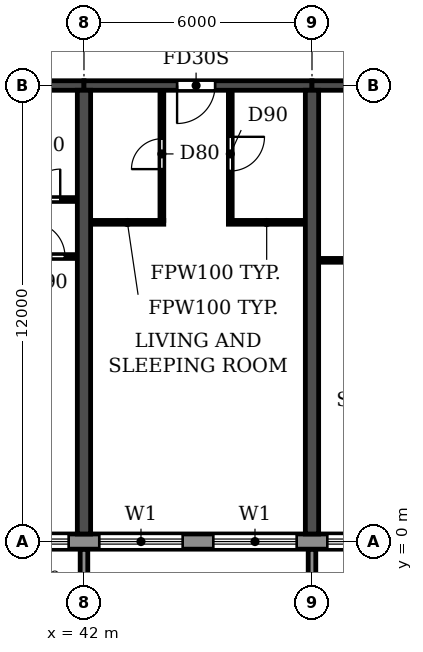
"""IFC4 building model, lengths in metres.
Left out: names, types, materials, properties, quantities, classifications, styles, units other than length and angle.
Written with IfcOpenShell. Run it as: python <this file> out.ifc"""

import sys

from ifc_helpers import new_model, si_unit, direction, frame, frame_2d, origin, place, context, subcontext, project, spatial, polyline, rectangle, outline, extrude, source, transform, mapped, element, fill, save


model = new_model("IFC4")
c1 = context("Model", 3, precision=1e-05, world=origin(), true_north=direction((0.0, 1.0)))
c2 = subcontext(c1, "Body", "Model", "MODEL_VIEW")
j1 = project(units=[si_unit("LENGTHUNIT", "METRE"), si_unit("PLANEANGLEUNIT", "RADIAN")], contexts=[c1])
p1 = place(None, origin())
s1 = spatial("IfcSite", under=j1, at=p1, CompositionType="ELEMENT")
p2 = place(p1, origin())
s2 = spatial("IfcBuilding", under=s1, at=p2, CompositionType="ELEMENT")
p3 = place(p2, frame((0.0, 0.0, 82.8)))
s3 = spatial("IfcBuildingStorey", under=s2, at=p3, CompositionType="ELEMENT", Elevation=82.8)
for number, where, z_axis, x_axis in (
    (1, (42.0, 0.2, 0.0), (0.0, 0.0, 1.0), (0.0, 1.0, 0.0)),
    (2, (48.0, 0.2, 0.0), (0.0, 0.0, 1.0), (0.0, 1.0, 0.0)),
):
    element("IfcWall", number, at=place(p3, frame(where, z_axis=z_axis, x_axis=x_axis)), inside=s3, PredefinedType="SHEAR", context=c2, shape_type="SweptSolid", body=[
        extrude(rectangle(XDim=11.675, YDim=0.35, at=frame_2d((5.837, 0.0))), origin(), (0.0, 0.0, 1.0), 3.06),
    ])
p4 = place(p3, frame((36.0, 12.0, 0.0), z_axis=(0.0, 0.0, 1.0), x_axis=(1.0, 0.0, 0.0)))
e3 = element("IfcWall", 3, at=p4, inside=s3, PredefinedType="SHEAR", context=c2, shape_type="SweptSolid", body=[
    extrude(rectangle(XDim=6.0, YDim=0.25, at=frame_2d((3.0, 0.0))), origin(), (0.0, 0.0, 1.0), 2.46),
])
p5 = place(p4, frame((2.55, 0.0, 0.0)))
e4 = element("IfcOpeningElement", 4, at=p5, cuts=e3, PredefinedType="OPENING", context=c2, shape_type="SweptSolid", body=[
    extrude(rectangle(XDim=1.0, YDim=2.1, at=frame_2d((0.5, 1.05))), frame((0.0, 0.135, 0.0), z_axis=(0.0, -1.0, 0.0), x_axis=(1.0, 0.0, 0.0)), (0.0, 0.0, 1.0), 0.27),
])
p6 = place(p3, frame((42.0, 12.0, 0.0), z_axis=(0.0, 0.0, 1.0), x_axis=(1.0, 0.0, 0.0)))
e5 = element("IfcWall", 5, at=p6, inside=s3, PredefinedType="SHEAR", context=c2, shape_type="SweptSolid", body=[
    extrude(rectangle(XDim=6.0, YDim=0.25, at=frame_2d((3.0, 0.0))), origin(), (0.0, 0.0, 1.0), 2.46),
])
p7 = place(p6, frame((2.45, 0.0, 0.0)))
e6 = element("IfcOpeningElement", 6, at=p7, cuts=e5, PredefinedType="OPENING", context=c2, shape_type="SweptSolid", body=[
    extrude(rectangle(XDim=1.0, YDim=2.1, at=frame_2d((0.5, 1.05))), frame((0.0, 0.135, 0.0), z_axis=(0.0, -1.0, 0.0), x_axis=(1.0, 0.0, 0.0)), (0.0, 0.0, 1.0), 0.27),
])
p8 = place(p3, frame((48.0, 12.0, 0.0), z_axis=(0.0, 0.0, 1.0), x_axis=(1.0, 0.0, 0.0)))
e7 = element("IfcWall", 7, at=p8, inside=s3, PredefinedType="SHEAR", context=c2, shape_type="SweptSolid", body=[
    extrude(rectangle(XDim=6.0, YDim=0.25, at=frame_2d((3.0, 0.0))), origin(), (0.0, 0.0, 1.0), 2.46),
])
p9 = place(p8, frame((2.45, 0.0, 0.0)))
e8 = element("IfcOpeningElement", 8, at=p9, cuts=e7, PredefinedType="OPENING", context=c2, shape_type="SweptSolid", body=[
    extrude(rectangle(XDim=1.0, YDim=2.1, at=frame_2d((0.5, 1.05))), frame((0.0, 0.135, 0.0), z_axis=(0.0, -1.0, 0.0), x_axis=(1.0, 0.0, 0.0)), (0.0, 0.0, 1.0), 0.27),
])
p10 = place(p3, frame((10.683, 0.0, 0.0), z_axis=(0.0, 0.0, 1.0), x_axis=(1.0, 0.0, 0.0)))
e9 = element("IfcWall", 9, at=p10, inside=s3, PredefinedType="STANDARD", context=c2, shape_type="SweptSolid", body=[
    extrude(rectangle(XDim=80.634, YDim=0.4, at=frame_2d((40.317, 0.0))), origin(), (0.0, 0.0, 1.0), 3.06),
])
p11 = place(p10, frame((1.717, 0.0, 0.9)))
e10 = element("IfcOpeningElement", 10, at=p11, cuts=e9, PredefinedType="OPENING", context=c2, shape_type="SweptSolid", body=[
    extrude(rectangle(XDim=2.2, YDim=1.5, at=frame_2d((1.1, 0.75))), frame((0.0, 0.21, 0.0), z_axis=(0.0, -1.0, 0.0), x_axis=(1.0, 0.0, 0.0)), (0.0, 0.0, 1.0), 0.42),
])
p12 = place(p10, frame((4.917, 0.0, 0.0)))
e11 = element("IfcOpeningElement", 11, at=p12, cuts=e9, PredefinedType="OPENING", context=c2, shape_type="SweptSolid", body=[
    extrude(rectangle(XDim=1.8, YDim=2.4, at=frame_2d((0.9, 1.2))), frame((0.0, 0.21, 0.0), z_axis=(0.0, -1.0, 0.0), x_axis=(1.0, 0.0, 0.0)), (0.0, 0.0, 1.0), 0.42),
])
p13 = place(p10, frame((7.717, 0.0, 0.9)))
e12 = element("IfcOpeningElement", 12, at=p13, cuts=e9, PredefinedType="OPENING", context=c2, shape_type="SweptSolid", body=[
    extrude(rectangle(XDim=2.2, YDim=1.5, at=frame_2d((1.1, 0.75))), frame((0.0, 0.21, 0.0), z_axis=(0.0, -1.0, 0.0), x_axis=(1.0, 0.0, 0.0)), (0.0, 0.0, 1.0), 0.42),
])
p14 = place(p10, frame((10.717, 0.0, 0.9)))
e13 = element("IfcOpeningElement", 13, at=p14, cuts=e9, PredefinedType="OPENING", context=c2, shape_type="SweptSolid", body=[
    extrude(rectangle(XDim=2.2, YDim=1.5, at=frame_2d((1.1, 0.75))), frame((0.0, 0.21, 0.0), z_axis=(0.0, -1.0, 0.0), x_axis=(1.0, 0.0, 0.0)), (0.0, 0.0, 1.0), 0.42),
])
p15 = place(p10, frame((13.917, 0.0, 0.0)))
e14 = element("IfcOpeningElement", 14, at=p15, cuts=e9, PredefinedType="OPENING", context=c2, shape_type="SweptSolid", body=[
    extrude(rectangle(XDim=1.8, YDim=2.4, at=frame_2d((0.9, 1.2))), frame((0.0, 0.21, 0.0), z_axis=(0.0, -1.0, 0.0), x_axis=(1.0, 0.0, 0.0)), (0.0, 0.0, 1.0), 0.42),
])
p16 = place(p10, frame((16.717, 0.0, 0.9)))
e15 = element("IfcOpeningElement", 15, at=p16, cuts=e9, PredefinedType="OPENING", context=c2, shape_type="SweptSolid", body=[
    extrude(rectangle(XDim=2.2, YDim=1.5, at=frame_2d((1.1, 0.75))), frame((0.0, 0.21, 0.0), z_axis=(0.0, -1.0, 0.0), x_axis=(1.0, 0.0, 0.0)), (0.0, 0.0, 1.0), 0.42),
])
p17 = place(p10, frame((19.717, 0.0, 0.9)))
e16 = element("IfcOpeningElement", 16, at=p17, cuts=e9, PredefinedType="OPENING", context=c2, shape_type="SweptSolid", body=[
    extrude(rectangle(XDim=2.2, YDim=1.5, at=frame_2d((1.1, 0.75))), frame((0.0, 0.21, 0.0), z_axis=(0.0, -1.0, 0.0), x_axis=(1.0, 0.0, 0.0)), (0.0, 0.0, 1.0), 0.42),
])
p18 = place(p10, frame((22.717, 0.0, 0.9)))
e17 = element("IfcOpeningElement", 17, at=p18, cuts=e9, PredefinedType="OPENING", context=c2, shape_type="SweptSolid", body=[
    extrude(rectangle(XDim=2.2, YDim=1.5, at=frame_2d((1.1, 0.75))), frame((0.0, 0.21, 0.0), z_axis=(0.0, -1.0, 0.0), x_axis=(1.0, 0.0, 0.0)), (0.0, 0.0, 1.0), 0.42),
])
p19 = place(p10, frame((25.917, 0.0, 0.0)))
e18 = element("IfcOpeningElement", 18, at=p19, cuts=e9, PredefinedType="OPENING", context=c2, shape_type="SweptSolid", body=[
    extrude(rectangle(XDim=1.8, YDim=2.4, at=frame_2d((0.9, 1.2))), frame((0.0, 0.21, 0.0), z_axis=(0.0, -1.0, 0.0), x_axis=(1.0, 0.0, 0.0)), (0.0, 0.0, 1.0), 0.42),
])
p20 = place(p10, frame((28.717, 0.0, 0.9)))
e19 = element("IfcOpeningElement", 19, at=p20, cuts=e9, PredefinedType="OPENING", context=c2, shape_type="SweptSolid", body=[
    extrude(rectangle(XDim=2.2, YDim=1.5, at=frame_2d((1.1, 0.75))), frame((0.0, 0.21, 0.0), z_axis=(0.0, -1.0, 0.0), x_axis=(1.0, 0.0, 0.0)), (0.0, 0.0, 1.0), 0.42),
])
p21 = place(p10, frame((31.717, 0.0, 0.9)))
e20 = element("IfcOpeningElement", 20, at=p21, cuts=e9, PredefinedType="OPENING", context=c2, shape_type="SweptSolid", body=[
    extrude(rectangle(XDim=2.2, YDim=1.5, at=frame_2d((1.1, 0.75))), frame((0.0, 0.21, 0.0), z_axis=(0.0, -1.0, 0.0), x_axis=(1.0, 0.0, 0.0)), (0.0, 0.0, 1.0), 0.42),
])
p22 = place(p10, frame((34.717, 0.0, 0.9)))
e21 = element("IfcOpeningElement", 21, at=p22, cuts=e9, PredefinedType="OPENING", context=c2, shape_type="SweptSolid", body=[
    extrude(rectangle(XDim=2.2, YDim=1.5, at=frame_2d((1.1, 0.75))), frame((0.0, 0.21, 0.0), z_axis=(0.0, -1.0, 0.0), x_axis=(1.0, 0.0, 0.0)), (0.0, 0.0, 1.0), 0.42),
])
p23 = place(p10, frame((37.717, 0.0, 0.9)))
e22 = element("IfcOpeningElement", 22, at=p23, cuts=e9, PredefinedType="OPENING", context=c2, shape_type="SweptSolid", body=[
    extrude(rectangle(XDim=2.2, YDim=1.5, at=frame_2d((1.1, 0.75))), frame((0.0, 0.21, 0.0), z_axis=(0.0, -1.0, 0.0), x_axis=(1.0, 0.0, 0.0)), (0.0, 0.0, 1.0), 0.42),
])
p24 = place(p10, frame((40.917, 0.0, 0.0)))
e23 = element("IfcOpeningElement", 23, at=p24, cuts=e9, PredefinedType="OPENING", context=c2, shape_type="SweptSolid", body=[
    extrude(rectangle(XDim=1.8, YDim=2.4, at=frame_2d((0.9, 1.2))), frame((0.0, 0.21, 0.0), z_axis=(0.0, -1.0, 0.0), x_axis=(1.0, 0.0, 0.0)), (0.0, 0.0, 1.0), 0.42),
])
p25 = place(p10, frame((43.717, 0.0, 0.9)))
e24 = element("IfcOpeningElement", 24, at=p25, cuts=e9, PredefinedType="OPENING", context=c2, shape_type="SweptSolid", body=[
    extrude(rectangle(XDim=2.2, YDim=1.5, at=frame_2d((1.1, 0.75))), frame((0.0, 0.21, 0.0), z_axis=(0.0, -1.0, 0.0), x_axis=(1.0, 0.0, 0.0)), (0.0, 0.0, 1.0), 0.42),
])
p26 = place(p10, frame((46.717, 0.0, 0.9)))
e25 = element("IfcOpeningElement", 25, at=p26, cuts=e9, PredefinedType="OPENING", context=c2, shape_type="SweptSolid", body=[
    extrude(rectangle(XDim=2.2, YDim=1.5, at=frame_2d((1.1, 0.75))), frame((0.0, 0.21, 0.0), z_axis=(0.0, -1.0, 0.0), x_axis=(1.0, 0.0, 0.0)), (0.0, 0.0, 1.0), 0.42),
])
p27 = place(p10, frame((49.717, 0.0, 0.9)))
e26 = element("IfcOpeningElement", 26, at=p27, cuts=e9, PredefinedType="OPENING", context=c2, shape_type="SweptSolid", body=[
    extrude(rectangle(XDim=2.2, YDim=1.5, at=frame_2d((1.1, 0.75))), frame((0.0, 0.21, 0.0), z_axis=(0.0, -1.0, 0.0), x_axis=(1.0, 0.0, 0.0)), (0.0, 0.0, 1.0), 0.42),
])
p28 = place(p10, frame((52.917, 0.0, 0.0)))
e27 = element("IfcOpeningElement", 27, at=p28, cuts=e9, PredefinedType="OPENING", context=c2, shape_type="SweptSolid", body=[
    extrude(rectangle(XDim=1.8, YDim=2.4, at=frame_2d((0.9, 1.2))), frame((0.0, 0.21, 0.0), z_axis=(0.0, -1.0, 0.0), x_axis=(1.0, 0.0, 0.0)), (0.0, 0.0, 1.0), 0.42),
])
p29 = place(p10, frame((55.717, 0.0, 0.9)))
e28 = element("IfcOpeningElement", 28, at=p29, cuts=e9, PredefinedType="OPENING", context=c2, shape_type="SweptSolid", body=[
    extrude(rectangle(XDim=2.2, YDim=1.5, at=frame_2d((1.1, 0.75))), frame((0.0, 0.21, 0.0), z_axis=(0.0, -1.0, 0.0), x_axis=(1.0, 0.0, 0.0)), (0.0, 0.0, 1.0), 0.42),
])
p30 = place(p10, frame((58.717, 0.0, 0.9)))
e29 = element("IfcOpeningElement", 29, at=p30, cuts=e9, PredefinedType="OPENING", context=c2, shape_type="SweptSolid", body=[
    extrude(rectangle(XDim=2.2, YDim=1.5, at=frame_2d((1.1, 0.75))), frame((0.0, 0.21, 0.0), z_axis=(0.0, -1.0, 0.0), x_axis=(1.0, 0.0, 0.0)), (0.0, 0.0, 1.0), 0.42),
])
p31 = place(p10, frame((61.717, 0.0, 0.9)))
e30 = element("IfcOpeningElement", 30, at=p31, cuts=e9, PredefinedType="OPENING", context=c2, shape_type="SweptSolid", body=[
    extrude(rectangle(XDim=2.2, YDim=1.5, at=frame_2d((1.1, 0.75))), frame((0.0, 0.21, 0.0), z_axis=(0.0, -1.0, 0.0), x_axis=(1.0, 0.0, 0.0)), (0.0, 0.0, 1.0), 0.42),
])
p32 = place(p10, frame((64.917, 0.0, 0.0)))
e31 = element("IfcOpeningElement", 31, at=p32, cuts=e9, PredefinedType="OPENING", context=c2, shape_type="SweptSolid", body=[
    extrude(rectangle(XDim=1.8, YDim=2.4, at=frame_2d((0.9, 1.2))), frame((0.0, 0.21, 0.0), z_axis=(0.0, -1.0, 0.0), x_axis=(1.0, 0.0, 0.0)), (0.0, 0.0, 1.0), 0.42),
])
p33 = place(p10, frame((67.717, 0.0, 0.9)))
e32 = element("IfcOpeningElement", 32, at=p33, cuts=e9, PredefinedType="OPENING", context=c2, shape_type="SweptSolid", body=[
    extrude(rectangle(XDim=2.2, YDim=1.5, at=frame_2d((1.1, 0.75))), frame((0.0, 0.21, 0.0), z_axis=(0.0, -1.0, 0.0), x_axis=(1.0, 0.0, 0.0)), (0.0, 0.0, 1.0), 0.42),
])
p34 = place(p10, frame((70.717, 0.0, 0.9)))
e33 = element("IfcOpeningElement", 33, at=p34, cuts=e9, PredefinedType="OPENING", context=c2, shape_type="SweptSolid", body=[
    extrude(rectangle(XDim=2.2, YDim=1.5, at=frame_2d((1.1, 0.75))), frame((0.0, 0.21, 0.0), z_axis=(0.0, -1.0, 0.0), x_axis=(1.0, 0.0, 0.0)), (0.0, 0.0, 1.0), 0.42),
])
p35 = place(p10, frame((73.917, 0.0, 0.0)))
e34 = element("IfcOpeningElement", 34, at=p35, cuts=e9, PredefinedType="OPENING", context=c2, shape_type="SweptSolid", body=[
    extrude(rectangle(XDim=1.8, YDim=2.4, at=frame_2d((0.9, 1.2))), frame((0.0, 0.21, 0.0), z_axis=(0.0, -1.0, 0.0), x_axis=(1.0, 0.0, 0.0)), (0.0, 0.0, 1.0), 0.42),
])
p36 = place(p10, frame((76.717, 0.0, 0.9)))
e35 = element("IfcOpeningElement", 35, at=p36, cuts=e9, PredefinedType="OPENING", context=c2, shape_type="SweptSolid", body=[
    extrude(rectangle(XDim=2.2, YDim=1.5, at=frame_2d((1.1, 0.75))), frame((0.0, 0.21, 0.0), z_axis=(0.0, -1.0, 0.0), x_axis=(1.0, 0.0, 0.0)), (0.0, 0.0, 1.0), 0.42),
])
m1 = source(origin(), c2, "Body", "SweptSolid", [
    extrude(outline(polyline([(0.0, 0.0), (0.2, 0.0), (0.2, 1.65), (0.0, 1.65), (0.0, 0.0)])), origin(), (0.0, 0.0, 1.0), 3.1),
])
for number, where in (
    (36, (41.9, -1.85, 0.0)),
    (37, (47.9, -1.85, 0.0)),
):
    element("IfcWall", number, at=place(p3, frame(where)), inside=s3, PredefinedType="STANDARD", context=c2, shape_type="MappedRepresentation", body=[
        mapped(m1, transform((0.0, 0.0, 0.0))),
    ])
p37 = place(p3, frame((48.185, 7.4, 0.0), z_axis=(0.0, 0.0, 1.0), x_axis=(1.0, 0.0, 0.0)))
e38 = element("IfcWall", 38, at=p37, inside=s3, PredefinedType="PARTITIONING", context=c2, shape_type="SweptSolid", body=[
    extrude(rectangle(XDim=1.915, YDim=0.1, at=frame_2d((0.958, 0.0))), origin(), (0.0, 0.0, 1.0), 3.06),
])
p38 = place(p3, frame((38.95, 7.5, 0.0), z_axis=(0.0, 0.0, 1.0), x_axis=(1.0, 0.0, 0.0)))
e39 = element("IfcWall", 39, at=p38, inside=s3, PredefinedType="PARTITIONING", context=c2, shape_type="SweptSolid", body=[
    extrude(rectangle(XDim=2.865, YDim=0.1, at=frame_2d((1.433, 0.0))), origin(), (0.0, 0.0, 1.0), 3.06),
])
p39 = place(p38, frame((1.65, 0.0, 0.0)))
e40 = element("IfcOpeningElement", 40, at=p39, cuts=e39, PredefinedType="OPENING", context=c2, shape_type="SweptSolid", body=[
    extrude(rectangle(XDim=0.9, YDim=2.1, at=frame_2d((0.45, 1.05))), frame((0.0, 0.06, 0.0), z_axis=(0.0, -1.0, 0.0), x_axis=(1.0, 0.0, 0.0)), (0.0, 0.0, 1.0), 0.12),
])
p40 = place(p3, frame((42.185, 8.4, 0.0), z_axis=(0.0, 0.0, 1.0), x_axis=(1.0, 0.0, 0.0)))
e41 = element("IfcWall", 41, at=p40, inside=s3, PredefinedType="PARTITIONING", context=c2, shape_type="SweptSolid", body=[
    extrude(rectangle(XDim=1.915, YDim=0.1, at=frame_2d((0.958, 0.0))), origin(), (0.0, 0.0, 1.0), 3.06),
])
p41 = place(p3, frame((45.8, 8.4, 0.0), z_axis=(0.0, 0.0, 1.0), x_axis=(1.0, 0.0, 0.0)))
e42 = element("IfcWall", 42, at=p41, inside=s3, PredefinedType="PARTITIONING", context=c2, shape_type="SweptSolid", body=[
    extrude(rectangle(XDim=2.015, YDim=0.1, at=frame_2d((1.007, 0.0))), origin(), (0.0, 0.0, 1.0), 3.06),
])
p42 = place(p3, frame((39.9, 9.0, 0.0), z_axis=(0.0, 0.0, 1.0), x_axis=(1.0, 0.0, 0.0)))
e43 = element("IfcWall", 43, at=p42, inside=s3, PredefinedType="PARTITIONING", context=c2, shape_type="SweptSolid", body=[
    extrude(rectangle(XDim=1.915, YDim=0.1, at=frame_2d((0.958, 0.0))), origin(), (0.0, 0.0, 1.0), 3.06),
])
p43 = place(p42, frame((0.675, 0.0, 0.0)))
e44 = element("IfcOpeningElement", 44, at=p43, cuts=e43, PredefinedType="OPENING", context=c2, shape_type="SweptSolid", body=[
    extrude(rectangle(XDim=0.8, YDim=2.1, at=frame_2d((0.4, 1.05))), frame((0.0, 0.06, 0.0), z_axis=(0.0, -1.0, 0.0), x_axis=(1.0, 0.0, 0.0)), (0.0, 0.0, 1.0), 0.12),
])
p44 = place(p3, frame((44.05, 8.45, 0.0), z_axis=(0.0, 0.0, 1.0), x_axis=(0.0, 1.0, 0.0)))
e45 = element("IfcWall", 45, at=p44, inside=s3, PredefinedType="PARTITIONING", context=c2, shape_type="SweptSolid", body=[
    extrude(rectangle(XDim=3.415, YDim=0.1, at=frame_2d((1.708, 0.0))), origin(), (0.0, 0.0, 1.0), 3.06),
])
p45 = place(p44, frame((1.35, 0.0, 0.0)))
e46 = element("IfcOpeningElement", 46, at=p45, cuts=e45, PredefinedType="OPENING", context=c2, shape_type="SweptSolid", body=[
    extrude(rectangle(XDim=0.8, YDim=2.1, at=frame_2d((0.4, 1.05))), frame((0.0, 0.06, 0.0), z_axis=(0.0, -1.0, 0.0), x_axis=(1.0, 0.0, 0.0)), (0.0, 0.0, 1.0), 0.12),
])
p46 = place(p3, frame((45.85, 8.45, 0.0), z_axis=(0.0, 0.0, 1.0), x_axis=(0.0, 1.0, 0.0)))
e47 = element("IfcWall", 47, at=p46, inside=s3, PredefinedType="PARTITIONING", context=c2, shape_type="SweptSolid", body=[
    extrude(rectangle(XDim=3.415, YDim=0.1, at=frame_2d((1.708, 0.0))), origin(), (0.0, 0.0, 1.0), 3.06),
])
p47 = place(p46, frame((1.3, 0.0, 0.0)))
e48 = element("IfcOpeningElement", 48, at=p47, cuts=e47, PredefinedType="OPENING", context=c2, shape_type="SweptSolid", body=[
    extrude(rectangle(XDim=0.9, YDim=2.1, at=frame_2d((0.45, 1.05))), frame((0.0, 0.06, 0.0), z_axis=(0.0, -1.0, 0.0), x_axis=(1.0, 0.0, 0.0)), (0.0, 0.0, 1.0), 0.12),
])
p48 = place(p20, origin())
e49 = element("IfcWindow", 49, at=p48, inside=s3, PartitioningType="DOUBLE_PANEL_HORIZONTAL", PredefinedType="WINDOW", context=c2, shape_type="SweptSolid", body=[
    extrude(rectangle(XDim=2.2, YDim=1.5, at=frame_2d((1.1, 0.75))), frame((0.0, 0.03, 0.0), z_axis=(0.0, -1.0, 0.0), x_axis=(1.0, 0.0, 0.0)), (0.0, 0.0, 1.0), 0.06),
])
fill(e19, e49)
p49 = place(p21, origin())
e50 = element("IfcWindow", 50, at=p49, inside=s3, PartitioningType="DOUBLE_PANEL_HORIZONTAL", PredefinedType="WINDOW", context=c2, shape_type="SweptSolid", body=[
    extrude(rectangle(XDim=2.2, YDim=1.5, at=frame_2d((1.1, 0.75))), frame((0.0, 0.03, 0.0), z_axis=(0.0, -1.0, 0.0), x_axis=(1.0, 0.0, 0.0)), (0.0, 0.0, 1.0), 0.06),
])
fill(e20, e50)
p50 = place(p22, origin())
e51 = element("IfcWindow", 51, at=p50, inside=s3, PartitioningType="DOUBLE_PANEL_HORIZONTAL", PredefinedType="WINDOW", context=c2, shape_type="SweptSolid", body=[
    extrude(rectangle(XDim=2.2, YDim=1.5, at=frame_2d((1.1, 0.75))), frame((0.0, 0.03, 0.0), z_axis=(0.0, -1.0, 0.0), x_axis=(1.0, 0.0, 0.0)), (0.0, 0.0, 1.0), 0.06),
])
fill(e21, e51)
p51 = place(p23, origin())
e52 = element("IfcWindow", 52, at=p51, inside=s3, PartitioningType="DOUBLE_PANEL_HORIZONTAL", PredefinedType="WINDOW", context=c2, shape_type="SweptSolid", body=[
    extrude(rectangle(XDim=2.2, YDim=1.5, at=frame_2d((1.1, 0.75))), frame((0.0, 0.03, 0.0), z_axis=(0.0, -1.0, 0.0), x_axis=(1.0, 0.0, 0.0)), (0.0, 0.0, 1.0), 0.06),
])
fill(e22, e52)
p52 = place(p43, origin())
e53 = element("IfcDoor", 53, at=p52, inside=s3, OperationType="SINGLE_SWING_RIGHT", PredefinedType="DOOR", context=c2, shape_type="SweptSolid", body=[
    extrude(rectangle(XDim=0.8, YDim=2.1, at=frame_2d((0.4, 1.05))), frame((0.0, 0.025, 0.0), z_axis=(0.0, -1.0, 0.0), x_axis=(1.0, 0.0, 0.0)), (0.0, 0.0, 1.0), 0.05),
])
fill(e44, e53)
p53 = place(p39, origin())
e54 = element("IfcDoor", 54, at=p53, inside=s3, OperationType="SINGLE_SWING_LEFT", PredefinedType="DOOR", context=c2, shape_type="SweptSolid", body=[
    extrude(rectangle(XDim=0.9, YDim=2.1, at=frame_2d((0.45, 1.05))), frame((0.0, 0.025, 0.0), z_axis=(0.0, -1.0, 0.0), x_axis=(1.0, 0.0, 0.0)), (0.0, 0.0, 1.0), 0.05),
])
fill(e40, e54)
p54 = place(p45, origin())
e55 = element("IfcDoor", 55, at=p54, inside=s3, OperationType="SINGLE_SWING_LEFT", PredefinedType="DOOR", context=c2, shape_type="SweptSolid", body=[
    extrude(rectangle(XDim=0.8, YDim=2.1, at=frame_2d((0.4, 1.05))), frame((0.0, 0.025, 0.0), z_axis=(0.0, -1.0, 0.0), x_axis=(1.0, 0.0, 0.0)), (0.0, 0.0, 1.0), 0.05),
])
fill(e46, e55)
p55 = place(p7, frame((1.0, 0.0, 0.0), z_axis=(0.0, 0.0, 1.0), x_axis=(-1.0, 0.0, 0.0)))
e56 = element("IfcDoor", 56, at=p55, inside=s3, OperationType="SINGLE_SWING_RIGHT", PredefinedType="DOOR", context=c2, shape_type="SweptSolid", body=[
    extrude(rectangle(XDim=1.0, YDim=2.1, at=frame_2d((0.5, 1.05))), frame((0.0, 0.025, 0.0), z_axis=(0.0, -1.0, 0.0), x_axis=(1.0, 0.0, 0.0)), (0.0, 0.0, 1.0), 0.05),
])
fill(e6, e56)
p56 = place(p47, frame((0.9, 0.0, 0.0), z_axis=(0.0, 0.0, 1.0), x_axis=(-1.0, 0.0, 0.0)))
e57 = element("IfcDoor", 57, at=p56, inside=s3, OperationType="SINGLE_SWING_LEFT", PredefinedType="DOOR", context=c2, shape_type="SweptSolid", body=[
    extrude(rectangle(XDim=0.9, YDim=2.1, at=frame_2d((0.45, 1.05))), frame((0.0, 0.025, 0.0), z_axis=(0.0, -1.0, 0.0), x_axis=(1.0, 0.0, 0.0)), (0.0, 0.0, 1.0), 0.05),
])
fill(e48, e57)
save(model, sys.argv[1])
